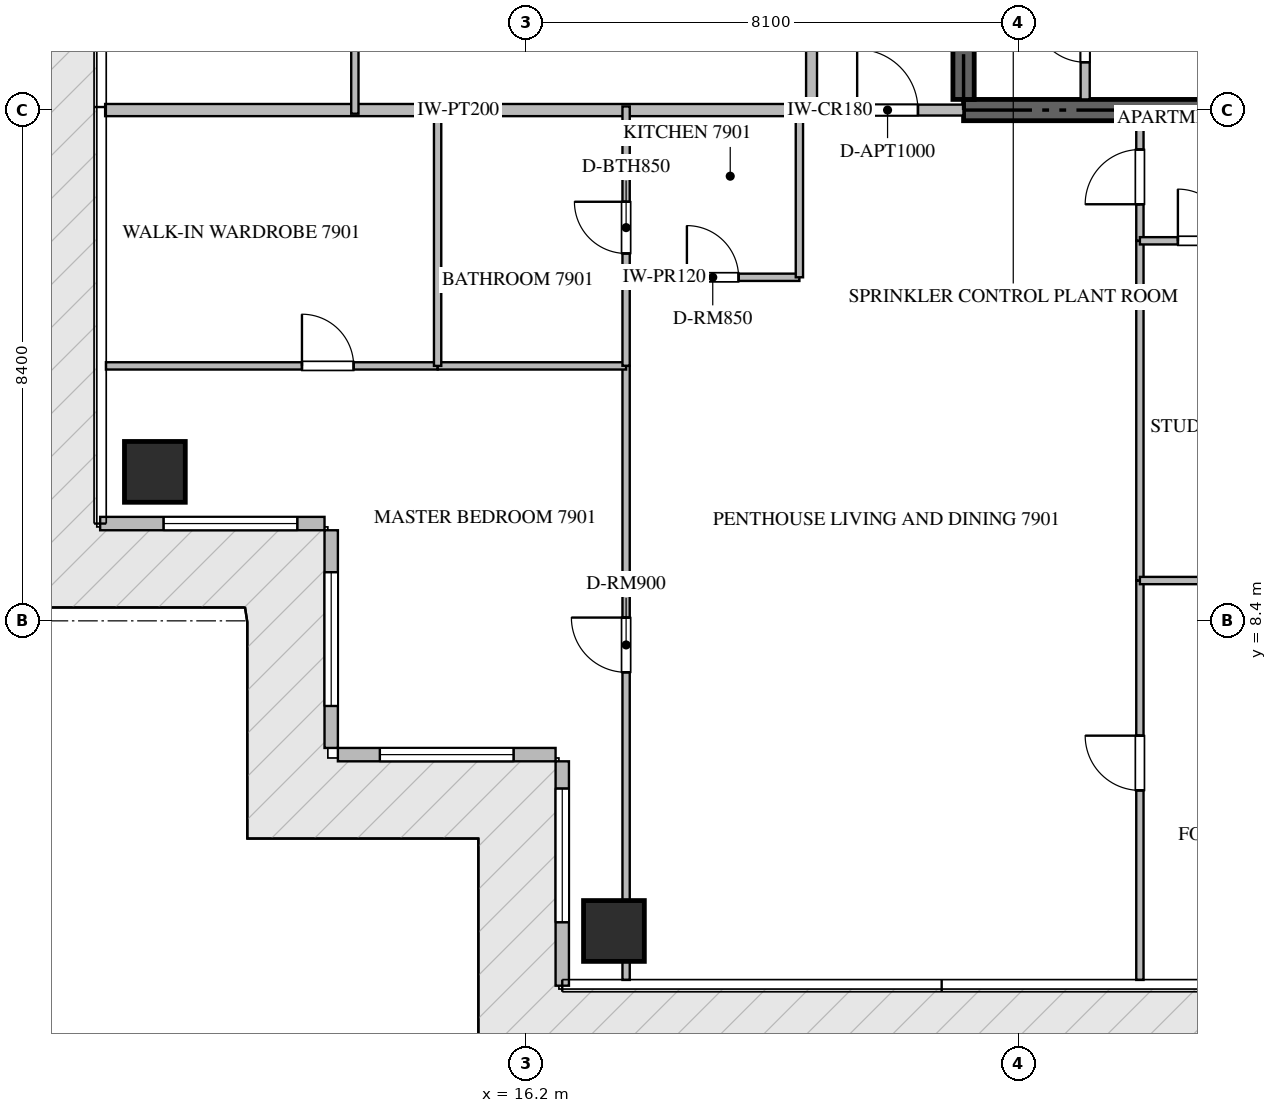
"""IFC4 building model, lengths in metres.
Left out: names, types, materials, properties, quantities, classifications, styles, units other than length and angle.
Written with IfcOpenShell. Run it as: python <this file> out.ifc"""

import sys

from ifc_helpers import new_model, si_unit, direction, frame, frame_2d, origin, origin_2d, place, context, subcontext, project, spatial, rectangle, extrude, source, transform, mapped, element, fill, save


model = new_model("IFC4")
c1 = context("Model", 3, precision=1e-05, world=origin(), true_north=direction((0.0, 1.0)))
c2 = subcontext(c1, "Body", "Model", "MODEL_VIEW")
j1 = project(units=[si_unit("LENGTHUNIT", "METRE"), si_unit("PLANEANGLEUNIT", "RADIAN")], contexts=[c1])
p1 = place(None, origin())
s1 = spatial("IfcSite", under=j1, at=p1, CompositionType="ELEMENT")
p2 = place(p1, origin())
s2 = spatial("IfcBuilding", under=s1, at=p2, CompositionType="ELEMENT")
p3 = place(p2, frame((0.0, 0.0, 317.75)))
s3 = spatial("IfcBuildingStorey", under=s2, at=p3, CompositionType="ELEMENT", Elevation=317.75)
p4 = place(p3, frame((23.4, 16.8, -0.26), z_axis=(0.0, 0.0, 1.0), x_axis=(1.0, 0.0, 0.0)))
e1 = element("IfcWall", 1, at=p4, inside=s3, PredefinedType="SHEAR", context=c2, shape_type="SweptSolid", body=[
    extrude(rectangle(XDim=18.0, YDim=0.35, at=frame_2d((9.0, 0.0))), origin(), (0.0, 0.0, 1.0), 4.048),
])
p5 = place(p3, frame((23.4, 16.975, -0.26), z_axis=(0.0, 0.0, 1.0), x_axis=(0.0, 1.0, 0.0)))
e2 = element("IfcWall", 2, at=p5, inside=s3, PredefinedType="SHEAR", context=c2, shape_type="SweptSolid", body=[
    extrude(rectangle(XDim=4.875, YDim=0.35, at=frame_2d((2.438, 0.0))), origin(), (0.0, 0.0, 1.0), 4.048),
])
m1 = source(origin(), c2, "Body", "SweptSolid", [
    extrude(rectangle(XDim=1.0, YDim=1.0, at=origin_2d()), origin(), (0.0, 0.0, 1.0), 4.05),
])
for number, where, z_axis, x_axis in (
    (3, (17.65, 3.3, -0.26), (0.0, 0.0, 1.0), (1.0, 0.0, 0.0)),
    (4, (10.1, 10.85, -0.26), (0.0, 0.0, 1.0), (1.0, 0.0, 0.0)),
):
    element("IfcColumn", number, at=place(p3, frame(where, z_axis=z_axis, x_axis=x_axis)), inside=s3, PredefinedType="COLUMN", context=c2, shape_type="MappedRepresentation", body=[
        mapped(m1, transform((0.0, 0.0, 0.0), scale=1.0)),
    ])
p6 = place(p3, frame((9.2, 10.0, 0.0), z_axis=(0.0, 0.0, 1.0), x_axis=(1.0, 0.0, 0.0)))
e5 = element("IfcWall", 5, at=p6, inside=s3, PredefinedType="ELEMENTEDWALL", context=c2, shape_type="SweptSolid", body=[
    extrude(rectangle(XDim=3.69, YDim=0.22, at=frame_2d((1.845, 0.0))), origin(), (0.0, 0.0, 1.0), 3.775),
])
p7 = place(p6, frame((1.043, 0.0, 0.65)))
e6 = element("IfcOpeningElement", 6, at=p7, cuts=e5, PredefinedType="OPENING", context=c2, shape_type="SweptSolid", body=[
    extrude(rectangle(XDim=2.2, YDim=2.4, at=frame_2d((1.1, 1.2))), frame((0.0, 0.12, 0.0), z_axis=(0.0, -1.0, 0.0), x_axis=(1.0, 0.0, 0.0)), (0.0, 0.0, 1.0), 0.24),
])
p8 = place(p3, frame((13.0, 9.89, 0.0), z_axis=(0.0, 0.0, 1.0), x_axis=(0.0, -1.0, 0.0)))
e7 = element("IfcWall", 7, at=p8, inside=s3, PredefinedType="ELEMENTEDWALL", context=c2, shape_type="SweptSolid", body=[
    extrude(rectangle(XDim=3.58, YDim=0.22, at=frame_2d((1.79, 0.0))), origin(), (0.0, 0.0, 1.0), 3.775),
])
p9 = place(p8, frame((0.69, 0.0, 0.65)))
e8 = element("IfcOpeningElement", 8, at=p9, cuts=e7, PredefinedType="OPENING", context=c2, shape_type="SweptSolid", body=[
    extrude(rectangle(XDim=2.2, YDim=2.4, at=frame_2d((1.1, 1.2))), frame((0.0, 0.12, 0.0), z_axis=(0.0, -1.0, 0.0), x_axis=(1.0, 0.0, 0.0)), (0.0, 0.0, 1.0), 0.24),
])
p10 = place(p3, frame((13.11, 6.2, 0.0), z_axis=(0.0, 0.0, 1.0), x_axis=(1.0, 0.0, 0.0)))
e9 = element("IfcWall", 9, at=p10, inside=s3, PredefinedType="ELEMENTEDWALL", context=c2, shape_type="SweptSolid", body=[
    extrude(rectangle(XDim=3.58, YDim=0.22, at=frame_2d((1.79, 0.0))), origin(), (0.0, 0.0, 1.0), 3.775),
])
p11 = place(p10, frame((0.69, 0.0, 0.65)))
e10 = element("IfcOpeningElement", 10, at=p11, cuts=e9, PredefinedType="OPENING", context=c2, shape_type="SweptSolid", body=[
    extrude(rectangle(XDim=2.2, YDim=2.4, at=frame_2d((1.1, 1.2))), frame((0.0, 0.12, 0.0), z_axis=(0.0, -1.0, 0.0), x_axis=(1.0, 0.0, 0.0)), (0.0, 0.0, 1.0), 0.24),
])
p12 = place(p3, frame((16.8, 6.09, 0.0), z_axis=(0.0, 0.0, 1.0), x_axis=(0.0, -1.0, 0.0)))
e11 = element("IfcWall", 11, at=p12, inside=s3, PredefinedType="ELEMENTEDWALL", context=c2, shape_type="SweptSolid", body=[
    extrude(rectangle(XDim=3.69, YDim=0.22, at=frame_2d((1.845, 0.0))), origin(), (0.0, 0.0, 1.0), 3.775),
])
p13 = place(p12, frame((0.447, 0.0, 0.65)))
e12 = element("IfcOpeningElement", 12, at=p13, cuts=e11, PredefinedType="OPENING", context=c2, shape_type="SweptSolid", body=[
    extrude(rectangle(XDim=2.2, YDim=2.4, at=frame_2d((1.1, 1.2))), frame((0.0, 0.12, 0.0), z_axis=(0.0, -1.0, 0.0), x_axis=(1.0, 0.0, 0.0)), (0.0, 0.0, 1.0), 0.24),
])
p14 = place(p3, frame((25.4, 16.975, 0.0), z_axis=(0.0, 0.0, 1.0), x_axis=(0.0, 1.0, 0.0)))
e13 = element("IfcWall", 13, at=p14, inside=s3, PredefinedType="PARTITIONING", context=c2, shape_type="SweptSolid", body=[
    extrude(rectangle(XDim=2.075, YDim=0.15, at=frame_2d((1.038, 0.0))), origin(), (0.0, 0.0, 1.0), 3.79),
])
p15 = place(p14, frame((0.612, 0.0, 0.0)))
e14 = element("IfcOpeningElement", 14, at=p15, cuts=e13, PredefinedType="OPENING", context=c2, shape_type="SweptSolid", body=[
    extrude(rectangle(XDim=0.85, YDim=2.1, at=frame_2d((0.425, 1.05))), frame((0.0, 0.085, 0.0), z_axis=(0.0, -1.0, 0.0), x_axis=(1.0, 0.0, 0.0)), (0.0, 0.0, 1.0), 0.17),
])
p16 = place(p3, frame((9.282, 16.8, 0.0), z_axis=(0.0, 0.0, 1.0), x_axis=(1.0, 0.0, 0.0)))
e15 = element("IfcWall", 15, at=p16, inside=s3, PredefinedType="PARTITIONING", context=c2, shape_type="SweptSolid", body=[
    extrude(rectangle(XDim=11.618, YDim=0.2, at=frame_2d((5.809, 0.0))), origin(), (0.0, 0.0, 1.0), 3.79),
])
p17 = place(p3, frame((20.902, 16.8, 0.0), z_axis=(0.0, 0.0, 1.0), x_axis=(1.0, 0.0, 0.0)))
e16 = element("IfcWall", 16, at=p17, inside=s3, PredefinedType="PARTITIONING", context=c2, shape_type="SweptSolid", body=[
    extrude(rectangle(XDim=2.496, YDim=0.18, at=frame_2d((1.248, 0.0))), origin(), (0.0, 0.0, 1.0), 3.79),
])
p18 = place(p17, frame((0.748, 0.0, 0.0)))
e17 = element("IfcOpeningElement", 17, at=p18, cuts=e16, PredefinedType="OPENING", context=c2, shape_type="SweptSolid", body=[
    extrude(rectangle(XDim=1.0, YDim=2.15, at=frame_2d((0.5, 1.075))), frame((0.0, 0.1, 0.0), z_axis=(0.0, -1.0, 0.0), x_axis=(1.0, 0.0, 0.0)), (0.0, 0.0, 1.0), 0.2),
])
p19 = place(p3, frame((20.9, 16.8, 0.0), z_axis=(0.0, 0.0, 1.0), x_axis=(0.0, 1.0, 0.0)))
e18 = element("IfcWall", 18, at=p19, inside=s3, PredefinedType="PARTITIONING", context=c2, shape_type="SweptSolid", body=[
    extrude(rectangle(XDim=16.8, YDim=0.18, at=frame_2d((8.4, 0.0))), origin(), (0.0, 0.0, 1.0), 3.79),
])
p20 = place(p19, frame((14.5, 0.0, 0.0)))
e19 = element("IfcOpeningElement", 19, at=p20, cuts=e18, PredefinedType="OPENING", context=c2, shape_type="SweptSolid", body=[
    extrude(rectangle(XDim=1.0, YDim=2.15, at=frame_2d((0.5, 1.075))), frame((0.0, 0.1, 0.0), z_axis=(0.0, -1.0, 0.0), x_axis=(1.0, 0.0, 0.0)), (0.0, 0.0, 1.0), 0.2),
])
p21 = place(p3, frame((17.85, 14.05, 0.0), z_axis=(0.0, 0.0, 1.0), x_axis=(1.0, 0.0, 0.0)))
e20 = element("IfcWall", 20, at=p21, inside=s3, PredefinedType="PARTITIONING", context=c2, shape_type="SweptSolid", body=[
    extrude(rectangle(XDim=2.85, YDim=0.12, at=frame_2d((1.425, 0.0))), origin(), (0.0, 0.0, 1.0), 3.79),
])
p22 = place(p21, frame((1.0, 0.0, 0.0)))
e21 = element("IfcOpeningElement", 21, at=p22, cuts=e20, PredefinedType="OPENING", context=c2, shape_type="SweptSolid", body=[
    extrude(rectangle(XDim=0.85, YDim=2.1, at=frame_2d((0.425, 1.05))), frame((0.0, 0.07, 0.0), z_axis=(0.0, -1.0, 0.0), x_axis=(1.0, 0.0, 0.0)), (0.0, 0.0, 1.0), 0.14),
])
p23 = place(p3, frame((20.7, 14.05, 0.0), z_axis=(0.0, 0.0, 1.0), x_axis=(0.0, 1.0, 0.0)))
e22 = element("IfcWall", 22, at=p23, inside=s3, PredefinedType="PARTITIONING", context=c2, shape_type="SweptSolid", body=[
    extrude(rectangle(XDim=2.81, YDim=0.12, at=frame_2d((1.405, 0.0))), origin(), (0.0, 0.0, 1.0), 3.79),
])
p24 = place(p3, frame((17.85, 2.495, 0.0), z_axis=(0.0, 0.0, 1.0), x_axis=(0.0, 1.0, 0.0)))
e23 = element("IfcWall", 23, at=p24, inside=s3, PredefinedType="PARTITIONING", context=c2, shape_type="SweptSolid", body=[
    extrude(rectangle(XDim=10.098, YDim=0.12, at=frame_2d((5.049, 0.0))), origin(), (0.0, 0.0, 1.0), 3.292),
])
p25 = place(p24, frame((5.059, 0.0, 0.0)))
e24 = element("IfcOpeningElement", 24, at=p25, cuts=e23, PredefinedType="OPENING", context=c2, shape_type="SweptSolid", body=[
    extrude(rectangle(XDim=0.9, YDim=2.1, at=frame_2d((0.45, 1.05))), frame((0.0, 0.07, 0.0), z_axis=(0.0, -1.0, 0.0), x_axis=(1.0, 0.0, 0.0)), (0.0, 0.0, 1.0), 0.14),
])
p26 = place(p3, frame((9.295, 12.593, 0.0), z_axis=(0.0, 0.0, 1.0), x_axis=(1.0, 0.0, 0.0)))
e25 = element("IfcWall", 25, at=p26, inside=s3, PredefinedType="PARTITIONING", context=c2, shape_type="SweptSolid", body=[
    extrude(rectangle(XDim=5.455, YDim=0.12, at=frame_2d((2.728, 0.0))), origin(), (0.0, 0.0, 1.0), 3.79),
])
p27 = place(p26, frame((3.224, 0.0, 0.0)))
e26 = element("IfcOpeningElement", 26, at=p27, cuts=e25, PredefinedType="OPENING", context=c2, shape_type="SweptSolid", body=[
    extrude(rectangle(XDim=0.85, YDim=2.1, at=frame_2d((0.425, 1.05))), frame((0.0, 0.07, 0.0), z_axis=(0.0, -1.0, 0.0), x_axis=(1.0, 0.0, 0.0)), (0.0, 0.0, 1.0), 0.14),
])
p28 = place(p3, frame((14.752, 12.593, 0.0), z_axis=(0.0, 0.0, 1.0), x_axis=(1.0, 0.0, 0.0)))
e27 = element("IfcWall", 27, at=p28, inside=s3, PredefinedType="PARTITIONING", context=c2, shape_type="SweptSolid", body=[
    extrude(rectangle(XDim=3.098, YDim=0.12, at=frame_2d((1.549, 0.0))), origin(), (0.0, 0.0, 1.0), 3.79),
])
p29 = place(p3, frame((14.75, 12.593, 0.0), z_axis=(0.0, 0.0, 1.0), x_axis=(0.0, 1.0, 0.0)))
e28 = element("IfcWall", 28, at=p29, inside=s3, PredefinedType="PARTITIONING", context=c2, shape_type="SweptSolid", body=[
    extrude(rectangle(XDim=4.267, YDim=0.12, at=frame_2d((2.134, 0.0))), origin(), (0.0, 0.0, 1.0), 3.79),
])
p30 = place(p3, frame((17.85, 12.595, 0.0), z_axis=(0.0, 0.0, 1.0), x_axis=(0.0, 1.0, 0.0)))
e29 = element("IfcWall", 29, at=p30, inside=s3, PredefinedType="PARTITIONING", context=c2, shape_type="SweptSolid", body=[
    extrude(rectangle(XDim=4.265, YDim=0.12, at=frame_2d((2.133, 0.0))), origin(), (0.0, 0.0, 1.0), 3.372),
])
p31 = place(p30, frame((1.847, 0.0, 0.0)))
e30 = element("IfcOpeningElement", 30, at=p31, cuts=e29, PredefinedType="OPENING", context=c2, shape_type="SweptSolid", body=[
    extrude(rectangle(XDim=0.85, YDim=2.1, at=frame_2d((0.425, 1.05))), frame((0.0, 0.07, 0.0), z_axis=(0.0, -1.0, 0.0), x_axis=(1.0, 0.0, 0.0)), (0.0, 0.0, 1.0), 0.14),
])
p32 = place(p3, frame((26.3, 14.65, 0.0), z_axis=(0.0, 0.0, 1.0), x_axis=(0.0, 1.0, 0.0)))
e31 = element("IfcWall", 31, at=p32, inside=s3, PredefinedType="PARTITIONING", context=c2, shape_type="SweptSolid", body=[
    extrude(rectangle(XDim=1.975, YDim=0.12, at=frame_2d((0.988, 0.0))), origin(), (0.0, 0.0, 1.0), 3.79),
])
p33 = place(p32, frame((0.601, 0.0, 0.0)))
e32 = element("IfcOpeningElement", 32, at=p33, cuts=e31, PredefinedType="OPENING", context=c2, shape_type="SweptSolid", body=[
    extrude(rectangle(XDim=0.9, YDim=2.1, at=frame_2d((0.45, 1.05))), frame((0.0, 0.07, 0.0), z_axis=(0.0, -1.0, 0.0), x_axis=(1.0, 0.0, 0.0)), (0.0, 0.0, 1.0), 0.14),
])
p34 = place(p3, frame((26.3, 2.495, 0.0), z_axis=(0.0, 0.0, 1.0), x_axis=(0.0, 1.0, 0.0)))
e33 = element("IfcWall", 33, at=p34, inside=s3, PredefinedType="PARTITIONING", context=c2, shape_type="SweptSolid", body=[
    extrude(rectangle(XDim=6.568, YDim=0.12, at=frame_2d((3.284, 0.0))), origin(), (0.0, 0.0, 1.0), 3.79),
])
p35 = place(p34, frame((3.117, 0.0, 0.0)))
e34 = element("IfcOpeningElement", 34, at=p35, cuts=e33, PredefinedType="OPENING", context=c2, shape_type="SweptSolid", body=[
    extrude(rectangle(XDim=0.9, YDim=2.1, at=frame_2d((0.45, 1.05))), frame((0.0, 0.07, 0.0), z_axis=(0.0, -1.0, 0.0), x_axis=(1.0, 0.0, 0.0)), (0.0, 0.0, 1.0), 0.14),
])
p36 = place(p3, frame((26.3, 9.065, 0.0), z_axis=(0.0, 0.0, 1.0), x_axis=(0.0, 1.0, 0.0)))
e35 = element("IfcWall", 35, at=p36, inside=s3, PredefinedType="PARTITIONING", context=c2, shape_type="SweptSolid", body=[
    extrude(rectangle(XDim=5.583, YDim=0.12, at=frame_2d((2.792, 0.0))), origin(), (0.0, 0.0, 1.0), 3.79),
])
p37 = place(p3, frame((26.3, 9.063, 0.0), z_axis=(0.0, 0.0, 1.0), x_axis=(1.0, 0.0, 0.0)))
e36 = element("IfcWall", 36, at=p37, inside=s3, PredefinedType="PARTITIONING", context=c2, shape_type="SweptSolid", body=[
    extrude(rectangle(XDim=5.15, YDim=0.12, at=frame_2d((2.575, 0.0))), origin(), (0.0, 0.0, 1.0), 3.79),
])
p38 = place(p3, frame((26.3, 14.65, 0.0), z_axis=(0.0, 0.0, 1.0), x_axis=(1.0, 0.0, 0.0)))
e37 = element("IfcWall", 37, at=p38, inside=s3, PredefinedType="PARTITIONING", context=c2, shape_type="SweptSolid", body=[
    extrude(rectangle(XDim=2.1, YDim=0.12, at=frame_2d((1.05, 0.0))), origin(), (0.0, 0.0, 1.0), 3.79),
])
p39 = place(p38, frame((0.625, 0.0, 0.0)))
e38 = element("IfcOpeningElement", 38, at=p39, cuts=e37, PredefinedType="OPENING", context=c2, shape_type="SweptSolid", body=[
    extrude(rectangle(XDim=0.85, YDim=2.1, at=frame_2d((0.425, 1.05))), frame((0.0, 0.07, 0.0), z_axis=(0.0, -1.0, 0.0), x_axis=(1.0, 0.0, 0.0)), (0.0, 0.0, 1.0), 0.14),
])
p40 = place(p3, frame((13.389, 16.74, 0.0), z_axis=(0.0, 0.0, 1.0), x_axis=(0.0, 1.0, 0.0)))
e39 = element("IfcWall", 39, at=p40, inside=s3, PredefinedType="PARTITIONING", context=c2, shape_type="SweptSolid", body=[
    extrude(rectangle(XDim=10.48, YDim=0.12, at=frame_2d((5.24, 0.0))), origin(), (0.0, 0.0, 1.0), 3.79),
])
m2 = source(origin(), c2, "Body", "SweptSolid", [
    extrude(rectangle(XDim=2.2, YDim=2.4, at=frame_2d((1.1, 1.2))), frame((0.0, 0.03, 0.0), z_axis=(0.0, -1.0, 0.0), x_axis=(1.0, 0.0, 0.0)), (0.0, 0.0, 1.0), 0.06),
])
p41 = place(p7, origin())
e40 = element("IfcWindow", 40, at=p41, inside=s3, PartitioningType="SINGLE_PANEL", PredefinedType="WINDOW", context=c2, shape_type="MappedRepresentation", body=[
    mapped(m2, transform((0.0, 0.0, 0.0), scale=1.0)),
])
fill(e6, e40)
p42 = place(p9, origin())
e41 = element("IfcWindow", 41, at=p42, inside=s3, PartitioningType="SINGLE_PANEL", PredefinedType="WINDOW", context=c2, shape_type="MappedRepresentation", body=[
    mapped(m2, transform((0.0, 0.0, 0.0), scale=1.0)),
])
fill(e8, e41)
p43 = place(p11, origin())
e42 = element("IfcWindow", 42, at=p43, inside=s3, PartitioningType="SINGLE_PANEL", PredefinedType="WINDOW", context=c2, shape_type="MappedRepresentation", body=[
    mapped(m2, transform((0.0, 0.0, 0.0), scale=1.0)),
])
fill(e10, e42)
p44 = place(p13, origin())
e43 = element("IfcWindow", 43, at=p44, inside=s3, PartitioningType="SINGLE_PANEL", PredefinedType="WINDOW", context=c2, shape_type="MappedRepresentation", body=[
    mapped(m2, transform((0.0, 0.0, 0.0), scale=1.0)),
])
fill(e12, e43)
m3 = source(origin(), c2, "Body", "SweptSolid", [
    extrude(rectangle(XDim=0.85, YDim=2.1, at=frame_2d((0.425, 1.05))), frame((0.0, 0.025, 0.0), z_axis=(0.0, -1.0, 0.0), x_axis=(1.0, 0.0, 0.0)), (0.0, 0.0, 1.0), 0.05),
])
p45 = place(p15, origin())
e44 = element("IfcDoor", 44, at=p45, inside=s3, OperationType="SINGLE_SWING_RIGHT", PredefinedType="DOOR", context=c2, shape_type="MappedRepresentation", body=[
    mapped(m3, transform((0.0, 0.0, 0.0), scale=1.0)),
])
fill(e14, e44)
m4 = source(origin(), c2, "Body", "SweptSolid", [
    extrude(rectangle(XDim=1.0, YDim=2.15, at=frame_2d((0.5, 1.075))), frame((0.0, 0.025, 0.0), z_axis=(0.0, -1.0, 0.0), x_axis=(1.0, 0.0, 0.0)), (0.0, 0.0, 1.0), 0.05),
])
p46 = place(p18, origin())
e45 = element("IfcDoor", 45, at=p46, inside=s3, OperationType="SINGLE_SWING_LEFT", PredefinedType="DOOR", context=c2, shape_type="MappedRepresentation", body=[
    mapped(m4, transform((0.0, 0.0, 0.0), scale=1.0)),
])
fill(e17, e45)
p47 = place(p22, origin())
e46 = element("IfcDoor", 46, at=p47, inside=s3, OperationType="SINGLE_SWING_LEFT", PredefinedType="DOOR", context=c2, shape_type="MappedRepresentation", body=[
    mapped(m3, transform((0.0, 0.0, 0.0), scale=1.0)),
])
fill(e21, e46)
m5 = source(origin(), c2, "Body", "SweptSolid", [
    extrude(rectangle(XDim=0.9, YDim=2.1, at=frame_2d((0.45, 1.05))), frame((0.0, 0.025, 0.0), z_axis=(0.0, -1.0, 0.0), x_axis=(1.0, 0.0, 0.0)), (0.0, 0.0, 1.0), 0.05),
])
p48 = place(p25, origin())
e47 = element("IfcDoor", 47, at=p48, inside=s3, OperationType="SINGLE_SWING_RIGHT", PredefinedType="DOOR", context=c2, shape_type="MappedRepresentation", body=[
    mapped(m5, transform((0.0, 0.0, 0.0), scale=1.0)),
])
fill(e24, e47)
p49 = place(p27, origin())
e48 = element("IfcDoor", 48, at=p49, inside=s3, OperationType="SINGLE_SWING_LEFT", PredefinedType="DOOR", context=c2, shape_type="MappedRepresentation", body=[
    mapped(m3, transform((0.0, 0.0, 0.0), scale=1.0)),
])
fill(e26, e48)
p50 = place(p31, origin())
e49 = element("IfcDoor", 49, at=p50, inside=s3, OperationType="SINGLE_SWING_RIGHT", PredefinedType="DOOR", context=c2, shape_type="MappedRepresentation", body=[
    mapped(m3, transform((0.0, 0.0, 0.0), scale=1.0)),
])
fill(e30, e49)
p51 = place(p33, origin())
e50 = element("IfcDoor", 50, at=p51, inside=s3, OperationType="SINGLE_SWING_LEFT", PredefinedType="DOOR", context=c2, shape_type="MappedRepresentation", body=[
    mapped(m5, transform((0.0, 0.0, 0.0), scale=1.0)),
])
fill(e32, e50)
p52 = place(p35, origin())
e51 = element("IfcDoor", 51, at=p52, inside=s3, OperationType="SINGLE_SWING_RIGHT", PredefinedType="DOOR", context=c2, shape_type="MappedRepresentation", body=[
    mapped(m5, transform((0.0, 0.0, 0.0), scale=1.0)),
])
fill(e34, e51)
p53 = place(p39, origin())
e52 = element("IfcDoor", 52, at=p53, inside=s3, OperationType="SINGLE_SWING_LEFT", PredefinedType="DOOR", context=c2, shape_type="MappedRepresentation", body=[
    mapped(m3, transform((0.0, 0.0, 0.0), scale=1.0)),
])
fill(e38, e52)
save(model, sys.argv[1])
